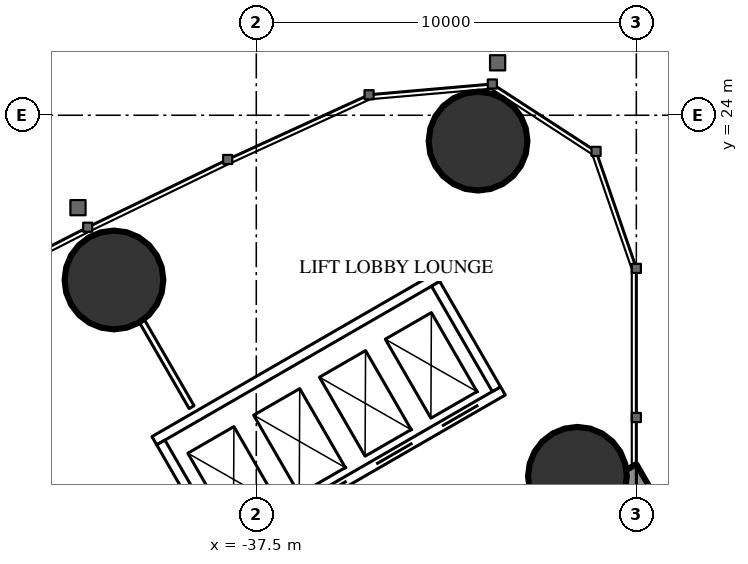
"""IFC4 building model, lengths in metres.
Left out: names, types, materials, properties, quantities, classifications, styles, units other than length and angle.
Written with IfcOpenShell. Run it as: python <this file> out.ifc"""

import sys

from ifc_helpers import new_model, si_unit, direction, frame, frame_2d, origin, origin_2d, place, context, subcontext, project, spatial, rectangle, hollow_circle, extrude, element, fill, save


model = new_model("IFC4")
c1 = context("Model", 3, precision=1e-05, world=origin(), true_north=direction((0.0, 1.0)))
c2 = subcontext(c1, "Body", "Model", "MODEL_VIEW")
j1 = project(units=[si_unit("LENGTHUNIT", "METRE"), si_unit("PLANEANGLEUNIT", "RADIAN")], contexts=[c1])
p1 = place(None, origin())
s1 = spatial("IfcSite", under=j1, at=p1, CompositionType="ELEMENT")
p2 = place(p1, origin())
s2 = spatial("IfcBuilding", under=s1, at=p2, CompositionType="ELEMENT")
p3 = place(p2, frame((0.0, 0.0, 122.1)))
s3 = spatial("IfcBuildingStorey", under=s2, at=p3, CompositionType="ELEMENT", Elevation=122.1)
for number, where, z_axis, x_axis in (
    (1, (-31.665, 23.318, 0.0), (0.0, 0.0, 1.0), (1.0, 0.0, 0.0)),
    (2, (-29.05, 14.5, 0.0), (0.0, 0.0, 1.0), (1.0, 0.0, 0.0)),
    (3, (-41.245, 19.666, 0.0), (0.0, 0.0, 1.0), (1.0, 0.0, 0.0)),
):
    element("IfcColumn", number, at=place(p3, frame(where, z_axis=z_axis, x_axis=x_axis)), inside=s3, PredefinedType="COLUMN", context=c2, shape_type="SweptSolid", body=[
        extrude(hollow_circle(Radius=1.3, WallThickness=0.1, at=origin_2d()), origin(), (0.0, 0.0, 1.0), 3.5),
    ])
p4 = place(p3, frame((-27.2, 14.3, 0.0), z_axis=(0.0, 0.0, 1.0), x_axis=(-0.866026593062, -0.499997940104, 0.0)))
e4 = element("IfcWall", 4, at=p4, inside=s3, PredefinedType="SHEAR", context=c2, shape_type="SweptSolid", body=[
    extrude(rectangle(XDim=28.946, YDim=1.2, at=frame_2d((14.473, 0.0))), origin(), (0.0, 0.0, 1.0), 3.5),
])
p5 = place(p4, frame((4.6, 0.0, 0.0)))
e5 = element("IfcOpeningElement", 5, at=p5, cuts=e4, PredefinedType="OPENING", context=c2, shape_type="SweptSolid", body=[
    extrude(rectangle(XDim=1.0, YDim=2.2, at=frame_2d((0.5, 1.1))), frame((0.0, 0.61, 0.0), z_axis=(0.0, -1.0, 0.0), x_axis=(1.0, 0.0, 0.0)), (0.0, 0.0, 1.0), 1.22),
])
p6 = place(p4, frame((13.395, 0.0, 0.0)))
e6 = element("IfcOpeningElement", 6, at=p6, cuts=e4, PredefinedType="OPENING", context=c2, shape_type="SweptSolid", body=[
    extrude(rectangle(XDim=1.8, YDim=2.2, at=frame_2d((0.9, 1.1))), frame((0.0, 0.61, 0.0), z_axis=(0.0, -1.0, 0.0), x_axis=(1.0, 0.0, 0.0)), (0.0, 0.0, 1.0), 1.22),
])
p7 = place(p3, frame((-39.202, 16.32, 0.0), z_axis=(0.0, 0.0, 1.0), x_axis=(-0.499947391036, 0.866055775454, 0.0)))
e7 = element("IfcWall", 7, at=p7, inside=s3, PredefinedType="PARTITIONING", context=c2, shape_type="SweptSolid", body=[
    extrude(rectangle(XDim=2.599, YDim=0.15, at=frame_2d((1.3, 0.0))), origin(), (0.0, 0.0, 1.0), 3.25),
])
p8 = place(p3, frame((-31.01, 16.747, 0.0), z_axis=(0.0, 0.0, 1.0), x_axis=(-0.866028165386, -0.499995216735, 0.0)))
e8 = element("IfcWall", 8, at=p8, inside=s3, PredefinedType="PARTITIONING", context=c2, shape_type="SweptSolid", body=[
    extrude(rectangle(XDim=8.6, YDim=0.25, at=frame_2d((4.3, 0.0))), origin(), (0.0, 0.0, 1.0), 3.25),
])
p9 = place(p8, frame((0.75, 0.0, 0.0)))
e9 = element("IfcOpeningElement", 9, at=p9, cuts=e8, PredefinedType="OPENING", context=c2, shape_type="SweptSolid", body=[
    extrude(rectangle(XDim=1.1, YDim=2.2, at=frame_2d((0.55, 1.1))), frame((0.0, 0.135, 0.0), z_axis=(0.0, -1.0, 0.0), x_axis=(1.0, 0.0, 0.0)), (0.0, 0.0, 1.0), 0.27),
])
p10 = place(p8, frame((2.75, 0.0, 0.0)))
e10 = element("IfcOpeningElement", 10, at=p10, cuts=e8, PredefinedType="OPENING", context=c2, shape_type="SweptSolid", body=[
    extrude(rectangle(XDim=1.1, YDim=2.2, at=frame_2d((0.55, 1.1))), frame((0.0, 0.135, 0.0), z_axis=(0.0, -1.0, 0.0), x_axis=(1.0, 0.0, 0.0)), (0.0, 0.0, 1.0), 0.27),
])
p11 = place(p8, frame((4.75, 0.0, 0.0)))
e11 = element("IfcOpeningElement", 11, at=p11, cuts=e8, PredefinedType="OPENING", context=c2, shape_type="SweptSolid", body=[
    extrude(rectangle(XDim=1.1, YDim=2.2, at=frame_2d((0.55, 1.1))), frame((0.0, 0.135, 0.0), z_axis=(0.0, -1.0, 0.0), x_axis=(1.0, 0.0, 0.0)), (0.0, 0.0, 1.0), 0.27),
])
p12 = place(p8, frame((6.75, 0.0, 0.0)))
e12 = element("IfcOpeningElement", 12, at=p12, cuts=e8, PredefinedType="OPENING", context=c2, shape_type="SweptSolid", body=[
    extrude(rectangle(XDim=1.1, YDim=2.2, at=frame_2d((0.55, 1.1))), frame((0.0, 0.135, 0.0), z_axis=(0.0, -1.0, 0.0), x_axis=(1.0, 0.0, 0.0)), (0.0, 0.0, 1.0), 0.27),
])
p13 = place(p3, frame((-32.736, 19.736, 0.0), z_axis=(0.0, 0.0, 1.0), x_axis=(-0.866028165386, -0.499995216735, 0.0)))
e13 = element("IfcWall", 13, at=p13, inside=s3, PredefinedType="PARTITIONING", context=c2, shape_type="SweptSolid", body=[
    extrude(rectangle(XDim=8.6, YDim=0.25, at=frame_2d((4.3, 0.0))), origin(), (0.0, 0.0, 1.0), 3.25),
])
p14 = place(p3, frame((-31.181, 16.793, 0.0), z_axis=(0.0, 0.0, 1.0), x_axis=(-0.499929347863, 0.866066190972, 0.0)))
e14 = element("IfcWall", 14, at=p14, inside=s3, PredefinedType="PARTITIONING", context=c2, shape_type="SweptSolid", body=[
    extrude(rectangle(XDim=3.201, YDim=0.25, at=frame_2d((1.6, 0.0))), origin(), (0.0, 0.0, 1.0), 3.25),
])
p15 = place(p3, frame((-38.413, 12.618, 0.0), z_axis=(0.0, 0.0, 1.0), x_axis=(-0.499872130319, 0.866099216793, 0.0)))
e15 = element("IfcWall", 15, at=p15, inside=s3, PredefinedType="PARTITIONING", context=c2, shape_type="SweptSolid", body=[
    extrude(rectangle(XDim=3.2, YDim=0.25, at=frame_2d((1.6, 0.0))), origin(), (0.0, 0.0, 1.0), 3.25),
])
p16 = place(p9, origin())
e16 = element("IfcDoor", 16, at=p16, inside=s3, OperationType="DOUBLE_DOOR_SLIDING", PredefinedType="USERDEFINED", context=c2, shape_type="SweptSolid", body=[
    extrude(rectangle(XDim=1.1, YDim=2.2, at=frame_2d((0.55, 1.1))), frame((0.0, 0.025, 0.0), z_axis=(0.0, -1.0, 0.0), x_axis=(1.0, 0.0, 0.0)), (0.0, 0.0, 1.0), 0.05),
])
fill(e9, e16)
p17 = place(p10, origin())
e17 = element("IfcDoor", 17, at=p17, inside=s3, OperationType="DOUBLE_DOOR_SLIDING", PredefinedType="USERDEFINED", context=c2, shape_type="SweptSolid", body=[
    extrude(rectangle(XDim=1.1, YDim=2.2, at=frame_2d((0.55, 1.1))), frame((0.0, 0.025, 0.0), z_axis=(0.0, -1.0, 0.0), x_axis=(1.0, 0.0, 0.0)), (0.0, 0.0, 1.0), 0.05),
])
fill(e10, e17)
p18 = place(p11, origin())
e18 = element("IfcDoor", 18, at=p18, inside=s3, OperationType="DOUBLE_DOOR_SLIDING", PredefinedType="USERDEFINED", context=c2, shape_type="SweptSolid", body=[
    extrude(rectangle(XDim=1.1, YDim=2.2, at=frame_2d((0.55, 1.1))), frame((0.0, 0.025, 0.0), z_axis=(0.0, -1.0, 0.0), x_axis=(1.0, 0.0, 0.0)), (0.0, 0.0, 1.0), 0.05),
])
fill(e11, e18)
save(model, sys.argv[1])
